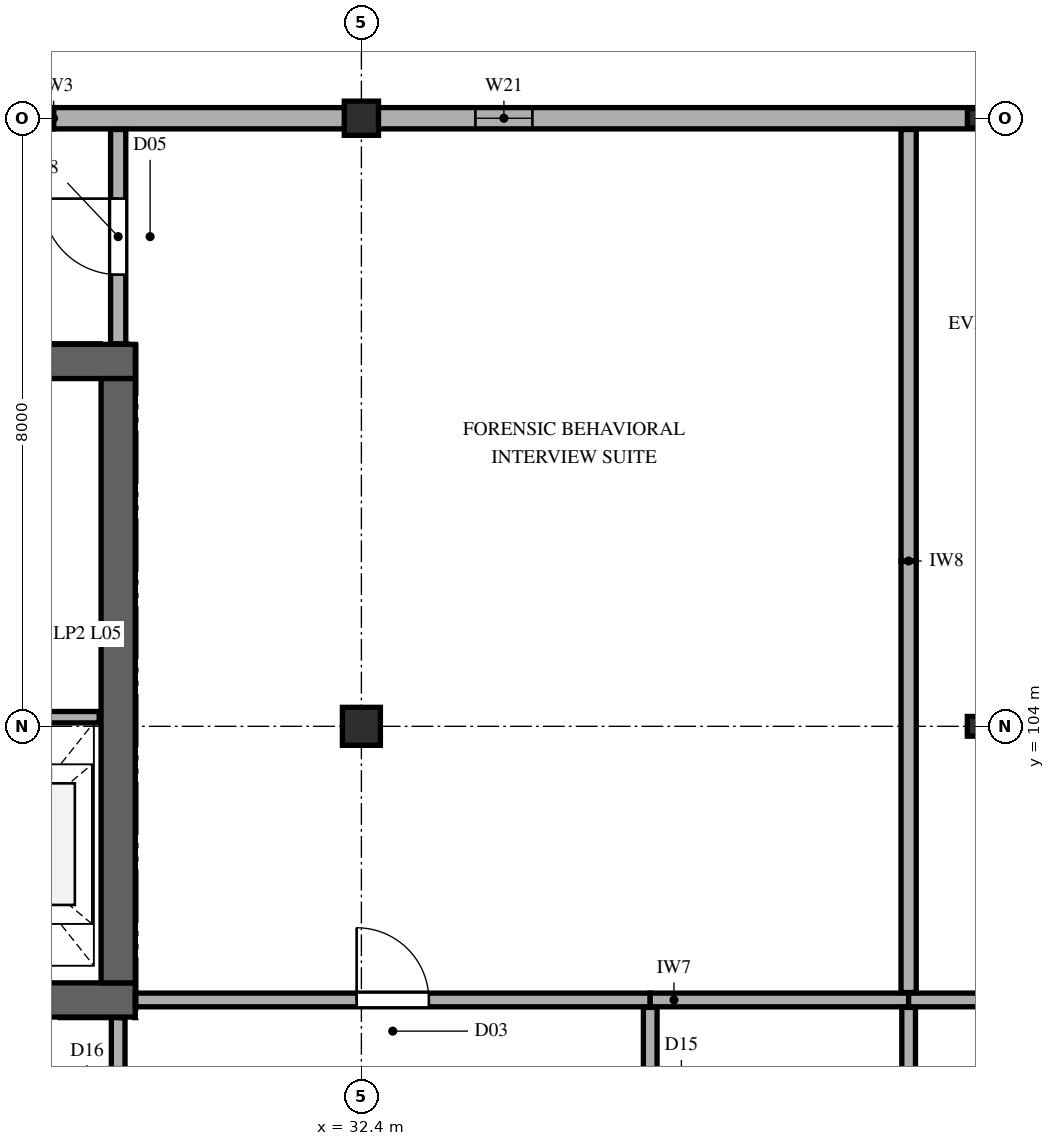
"""IFC4 building model, lengths in metres.
Left out: names, types, materials, properties, quantities, classifications, styles, units other than length and angle.
Written with IfcOpenShell. Run it as: python <this file> out.ifc"""

import sys

from ifc_helpers import new_model, si_unit, direction, frame, frame_2d, origin, origin_2d, place, context, subcontext, project, spatial, rectangle, hollow_rectangle, i_section, extrude, element, fill, save


model = new_model("IFC4")
c1 = context("Model", 3, precision=1e-05, world=origin(), true_north=direction((0.0, 1.0)))
c2 = subcontext(c1, "Body", "Model", "MODEL_VIEW")
j1 = project(units=[si_unit("LENGTHUNIT", "METRE"), si_unit("PLANEANGLEUNIT", "RADIAN")], contexts=[c1])
p1 = place(None, origin())
s1 = spatial("IfcSite", under=j1, at=p1, CompositionType="ELEMENT")
p2 = place(p1, origin())
s2 = spatial("IfcBuilding", under=s1, at=p2, CompositionType="ELEMENT")
p3 = place(p2, frame((0.0, 0.0, 24.9)))
s3 = spatial("IfcBuildingStorey", under=s2, at=p3, CompositionType="ELEMENT", Elevation=24.9)
p4 = place(p3, frame((16.36, 100.4, 0.0), z_axis=(0.0, 0.0, 1.0), x_axis=(1.0, 0.0, 0.0)))
e1 = element("IfcWall", 1, at=p4, inside=s3, PredefinedType="SHEAR", context=c2, shape_type="SweptSolid", body=[
    extrude(rectangle(XDim=13.065, YDim=0.45, at=frame_2d((6.532, 0.0))), origin(), (0.0, 0.0, 1.0), 4.2),
])
p5 = place(p4, frame((1.39, 0.0, 0.0)))
e2 = element("IfcOpeningElement", 2, at=p5, cuts=e1, PredefinedType="OPENING", context=c2, shape_type="SweptSolid", body=[
    extrude(rectangle(XDim=1.15, YDim=2.25, at=frame_2d((0.575, 1.125))), frame((0.0, 0.235, 0.0), z_axis=(0.0, -1.0, 0.0), x_axis=(1.0, 0.0, 0.0)), (0.0, 0.0, 1.0), 0.47),
])
p6 = place(p4, frame((10.695, 0.0, 0.0)))
e3 = element("IfcOpeningElement", 3, at=p6, cuts=e1, PredefinedType="OPENING", context=c2, shape_type="SweptSolid", body=[
    extrude(rectangle(XDim=1.1, YDim=2.2, at=frame_2d((0.55, 1.1))), frame((0.0, 0.235, 0.0), z_axis=(0.0, -1.0, 0.0), x_axis=(1.0, 0.0, 0.0)), (0.0, 0.0, 1.0), 0.47),
])
p7 = place(p3, frame((16.36, 108.8, 0.0), z_axis=(0.0, 0.0, 1.0), x_axis=(1.0, 0.0, 0.0)))
e4 = element("IfcWall", 4, at=p7, inside=s3, PredefinedType="SHEAR", context=c2, shape_type="SweptSolid", body=[
    extrude(rectangle(XDim=13.065, YDim=0.45, at=frame_2d((6.532, 0.0))), origin(), (0.0, 0.0, 1.0), 4.2),
])
p8 = place(p3, frame((29.2, 100.625, 0.0), z_axis=(0.0, 0.0, 1.0), x_axis=(0.0, 1.0, 0.0)))
e5 = element("IfcWall", 5, at=p8, inside=s3, PredefinedType="SHEAR", context=c2, shape_type="SweptSolid", body=[
    extrude(rectangle(XDim=7.95, YDim=0.45, at=frame_2d((3.975, 0.0))), origin(), (0.0, 0.0, 1.0), 4.2),
])
p9 = place(p3, frame((32.4, 104.0, 0.0), z_axis=(0.0, 0.0, 1.0), x_axis=(1.0, 0.0, 0.0)))
e6 = element("IfcColumn", 6, at=p9, inside=s3, PredefinedType="COLUMN", context=c2, shape_type="SweptSolid", body=[
    extrude(rectangle(XDim=0.5, YDim=0.5, at=origin_2d()), origin(), (0.0, 0.0, 1.0), 4.2),
])
p10 = place(p3, frame((32.4, 112.0, 0.0), z_axis=(0.0, 0.0, 1.0), x_axis=(1.0, 0.0, 0.0)))
e7 = element("IfcColumn", 7, at=p10, inside=s3, PredefinedType="COLUMN", context=c2, shape_type="SweptSolid", body=[
    extrude(rectangle(XDim=0.45, YDim=0.45, at=origin_2d()), origin(), (0.0, 0.0, 1.0), 4.2),
])
p11 = place(p3, frame((40.5, 104.0, 0.0), z_axis=(0.0, 0.0, 1.0), x_axis=(1.0, 0.0, 0.0)))
e8 = element("IfcColumn", 8, at=p11, inside=s3, PredefinedType="COLUMN", context=c2, shape_type="SweptSolid", body=[
    extrude(i_section(OverallWidth=0.256, OverallDepth=0.26, WebThickness=0.011, FlangeThickness=0.017, FilletRadius=0.013, at=origin_2d()), origin(), (0.0, 0.0, 1.0), 4.2),
])
p12 = place(p3, frame((40.5, 112.0, 0.0), z_axis=(0.0, 0.0, 1.0), x_axis=(1.0, 0.0, 0.0)))
e9 = element("IfcColumn", 9, at=p12, inside=s3, PredefinedType="COLUMN", context=c2, shape_type="SweptSolid", body=[
    extrude(hollow_rectangle(XDim=0.254, YDim=0.254, WallThickness=0.013, InnerFilletRadius=0.013, OuterFilletRadius=0.025, at=origin_2d()), origin(), (0.0, 0.0, 1.0), 4.2),
])
p13 = place(p3, frame((40.5, 112.0, 0.0), z_axis=(0.0, 0.0, 1.0), x_axis=(-1.0, 0.0, 0.0)))
e10 = element("IfcWall", 10, at=p13, inside=s3, PredefinedType="SOLIDWALL", context=c2, shape_type="SweptSolid", body=[
    extrude(rectangle(XDim=12.15, YDim=0.28, at=frame_2d((6.075, 0.0))), origin(), (0.0, 0.0, 1.0), 3.402),
])
p14 = place(p13, frame((5.85, 0.0, 0.85)))
e11 = element("IfcOpeningElement", 11, at=p14, cuts=e10, PredefinedType="OPENING", context=c2, shape_type="SweptSolid", body=[
    extrude(rectangle(XDim=0.75, YDim=2.2, at=frame_2d((0.375, 1.1))), frame((0.0, 0.15, 0.0), z_axis=(0.0, -1.0, 0.0), x_axis=(1.0, 0.0, 0.0)), (0.0, 0.0, 1.0), 0.3),
])
p15 = place(p3, frame((28.35, 112.0, 0.0), z_axis=(0.0, 0.0, 1.0), x_axis=(-1.0, 0.0, 0.0)))
e12 = element("IfcWall", 12, at=p15, inside=s3, PredefinedType="SOLIDWALL", context=c2, shape_type="SweptSolid", body=[
    extrude(rectangle(XDim=12.15, YDim=0.28, at=frame_2d((6.075, 0.0))), origin(), (0.0, 0.0, 1.0), 3.402),
])
p16 = place(p15, frame((6.75, 0.0, 0.95)))
e13 = element("IfcOpeningElement", 13, at=p16, cuts=e12, PredefinedType="OPENING", context=c2, shape_type="SweptSolid", body=[
    extrude(rectangle(XDim=2.7, YDim=0.9, at=frame_2d((1.35, 0.45))), frame((0.0, 0.15, 0.0), z_axis=(0.0, -1.0, 0.0), x_axis=(1.0, 0.0, 0.0)), (0.0, 0.0, 1.0), 0.3),
])
p17 = place(p3, frame((26.3, 104.12, 0.0), z_axis=(0.0, 0.0, 1.0), x_axis=(1.0, 0.0, 0.0)))
e14 = element("IfcWall", 14, at=p17, inside=s3, PredefinedType="PARTITIONING", context=c2, shape_type="SweptSolid", body=[
    extrude(rectangle(XDim=2.65, YDim=0.15, at=frame_2d((1.325, 0.0))), origin(), (0.0, 0.0, 1.0), 3.96),
])
p18 = place(p3, frame((29.425, 100.4, 0.0), z_axis=(0.0, 0.0, 1.0), x_axis=(1.0, 0.0, 0.0)))
e15 = element("IfcWall", 15, at=p18, inside=s3, PredefinedType="PARTITIONING", context=c2, shape_type="SweptSolid", body=[
    extrude(rectangle(XDim=6.775, YDim=0.18, at=frame_2d((3.387, 0.0))), origin(), (0.0, 0.0, 1.0), 3.96),
])
p19 = place(p18, frame((2.913, 0.0, 0.0)))
e16 = element("IfcOpeningElement", 16, at=p19, cuts=e15, PredefinedType="OPENING", context=c2, shape_type="SweptSolid", body=[
    extrude(rectangle(XDim=0.95, YDim=2.15, at=frame_2d((0.475, 1.075))), frame((0.0, 0.1, 0.0), z_axis=(0.0, -1.0, 0.0), x_axis=(1.0, 0.0, 0.0)), (0.0, 0.0, 1.0), 0.2),
])
p20 = place(p3, frame((36.2, 100.4, 0.0), z_axis=(0.0, 0.0, 1.0), x_axis=(1.0, 0.0, 0.0)))
e17 = element("IfcWall", 17, at=p20, inside=s3, PredefinedType="PARTITIONING", context=c2, shape_type="SweptSolid", body=[
    extrude(rectangle(XDim=3.4, YDim=0.18, at=frame_2d((1.7, 0.0))), origin(), (0.0, 0.0, 1.0), 3.96),
])
p21 = place(p3, frame((39.6, 100.4, 0.0), z_axis=(0.0, 0.0, 1.0), x_axis=(1.0, 0.0, 0.0)))
e18 = element("IfcWall", 18, at=p21, inside=s3, PredefinedType="PARTITIONING", context=c2, shape_type="SweptSolid", body=[
    extrude(rectangle(XDim=4.0, YDim=0.18, at=frame_2d((2.0, 0.0))), origin(), (0.0, 0.0, 1.0), 3.96),
])
p22 = place(p3, frame((29.2, 96.898, 0.0), z_axis=(0.0, 0.0, 1.0), x_axis=(0.0, 1.0, 0.0)))
e19 = element("IfcWall", 19, at=p22, inside=s3, PredefinedType="PARTITIONING", context=c2, shape_type="SweptSolid", body=[
    extrude(rectangle(XDim=3.269, YDim=0.18, at=frame_2d((1.635, 0.0))), origin(), (0.0, 0.0, 1.0), 3.96),
])
p23 = place(p22, frame((1.034, 0.0, 0.0)))
e20 = element("IfcOpeningElement", 20, at=p23, cuts=e19, PredefinedType="OPENING", context=c2, shape_type="SweptSolid", body=[
    extrude(rectangle(XDim=1.2, YDim=2.2, at=frame_2d((0.6, 1.1))), frame((0.0, 0.1, 0.0), z_axis=(0.0, -1.0, 0.0), x_axis=(1.0, 0.0, 0.0)), (0.0, 0.0, 1.0), 0.2),
])
p24 = place(p3, frame((29.2, 109.033, 0.0), z_axis=(0.0, 0.0, 1.0), x_axis=(0.0, 1.0, 0.0)))
e21 = element("IfcWall", 21, at=p24, inside=s3, PredefinedType="PARTITIONING", context=c2, shape_type="SweptSolid", body=[
    extrude(rectangle(XDim=2.819, YDim=0.2, at=frame_2d((1.41, 0.0))), origin(), (0.0, 0.0, 1.0), 3.96),
])
p25 = place(p24, frame((0.909, 0.0, 0.0)))
e22 = element("IfcOpeningElement", 22, at=p25, cuts=e21, PredefinedType="OPENING", context=c2, shape_type="SweptSolid", body=[
    extrude(rectangle(XDim=1.0, YDim=2.2, at=frame_2d((0.5, 1.1))), frame((0.0, 0.11, 0.0), z_axis=(0.0, -1.0, 0.0), x_axis=(1.0, 0.0, 0.0)), (0.0, 0.0, 1.0), 0.22),
])
p26 = place(p3, frame((36.2, 96.898, 0.0), z_axis=(0.0, 0.0, 1.0), x_axis=(0.0, 1.0, 0.0)))
e23 = element("IfcWall", 23, at=p26, inside=s3, PredefinedType="PARTITIONING", context=c2, shape_type="SweptSolid", body=[
    extrude(rectangle(XDim=3.404, YDim=0.18, at=frame_2d((1.702, 0.0))), origin(), (0.0, 0.0, 1.0), 3.649),
])
p27 = place(p26, frame((1.152, 0.0, 0.0)))
e24 = element("IfcOpeningElement", 24, at=p27, cuts=e23, PredefinedType="OPENING", context=c2, shape_type="SweptSolid", body=[
    extrude(rectangle(XDim=1.1, YDim=2.2, at=frame_2d((0.55, 1.1))), frame((0.0, 0.1, 0.0), z_axis=(0.0, -1.0, 0.0), x_axis=(1.0, 0.0, 0.0)), (0.0, 0.0, 1.0), 0.2),
])
p28 = place(p3, frame((39.6, 96.098, 0.0), z_axis=(0.0, 0.0, 1.0), x_axis=(0.0, 1.0, 0.0)))
e25 = element("IfcWall", 25, at=p28, inside=s3, PredefinedType="PARTITIONING", context=c2, shape_type="SweptSolid", body=[
    extrude(rectangle(XDim=4.204, YDim=0.18, at=frame_2d((2.102, 0.0))), origin(), (0.0, 0.0, 1.0), 3.96),
])
p29 = place(p28, frame((1.502, 0.0, 0.0)))
e26 = element("IfcOpeningElement", 26, at=p29, cuts=e25, PredefinedType="OPENING", context=c2, shape_type="SweptSolid", body=[
    extrude(rectangle(XDim=1.2, YDim=2.2, at=frame_2d((0.6, 1.1))), frame((0.0, 0.1, 0.0), z_axis=(0.0, -1.0, 0.0), x_axis=(1.0, 0.0, 0.0)), (0.0, 0.0, 1.0), 0.2),
])
for number, where, z_axis, x_axis in (
    (27, (39.6, 100.498, 0.0), (0.0, 0.0, 1.0), (0.0, 1.0, 0.0)),
    (28, (39.6, 106.175, 0.0), (0.0, 0.0, 1.0), (0.0, 1.0, 0.0)),
):
    element("IfcWall", number, at=place(p3, frame(where, z_axis=z_axis, x_axis=x_axis)), inside=s3, PredefinedType="PARTITIONING", context=c2, shape_type="SweptSolid", body=[
        extrude(rectangle(XDim=5.677, YDim=0.2, at=frame_2d((2.838, 0.0))), origin(), (0.0, 0.0, 1.0), 3.96),
    ])
p30 = place(p14, origin())
e29 = element("IfcWindow", 29, at=p30, inside=s3, PartitioningType="SINGLE_PANEL", PredefinedType="WINDOW", context=c2, shape_type="SweptSolid", body=[
    extrude(rectangle(XDim=0.75, YDim=2.2, at=frame_2d((0.375, 1.1))), frame((0.0, 0.03, 0.0), z_axis=(0.0, -1.0, 0.0), x_axis=(1.0, 0.0, 0.0)), (0.0, 0.0, 1.0), 0.06),
])
fill(e11, e29)
p31 = place(p19, origin())
e30 = element("IfcDoor", 30, at=p31, inside=s3, OperationType="SINGLE_SWING_LEFT", PredefinedType="DOOR", context=c2, shape_type="SweptSolid", body=[
    extrude(rectangle(XDim=0.95, YDim=2.15, at=frame_2d((0.475, 1.075))), frame((0.0, 0.025, 0.0), z_axis=(0.0, -1.0, 0.0), x_axis=(1.0, 0.0, 0.0)), (0.0, 0.0, 1.0), 0.05),
])
fill(e16, e30)
p32 = place(p25, origin())
e31 = element("IfcDoor", 31, at=p32, inside=s3, OperationType="SINGLE_SWING_RIGHT", PredefinedType="DOOR", context=c2, shape_type="SweptSolid", body=[
    extrude(rectangle(XDim=1.0, YDim=2.2, at=frame_2d((0.5, 1.1))), frame((0.0, 0.025, 0.0), z_axis=(0.0, -1.0, 0.0), x_axis=(1.0, 0.0, 0.0)), (0.0, 0.0, 1.0), 0.05),
])
fill(e22, e31)
save(model, sys.argv[1])
